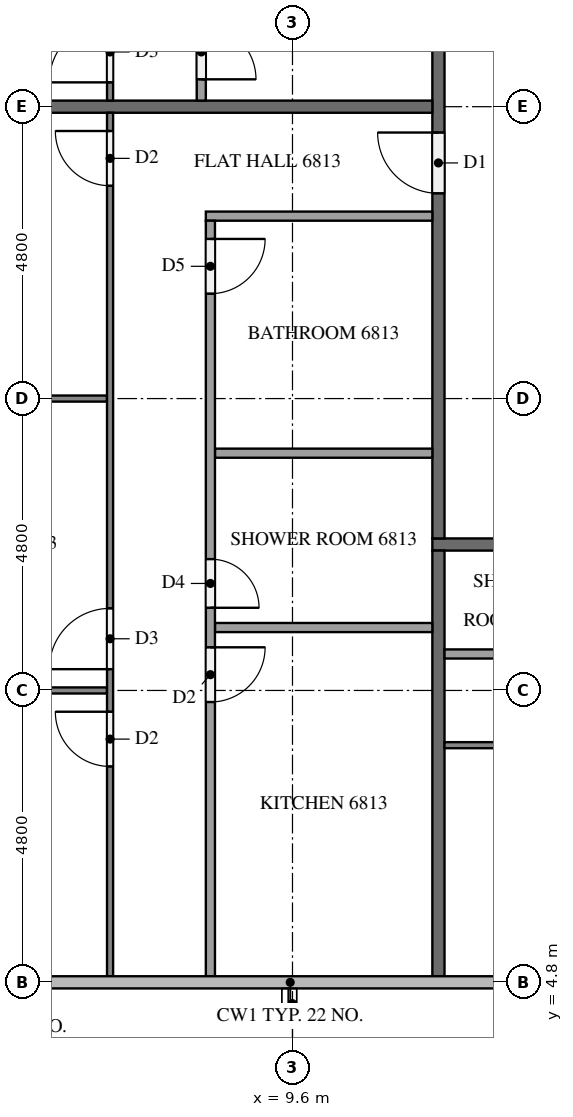
"""IFC4 building model, lengths in metres.
Left out: names, types, materials, properties, quantities, classifications, styles, units other than length and angle.
Written with IfcOpenShell. Run it as: python <this file> out.ifc"""

import sys

from ifc_helpers import new_model, si_unit, direction, frame, frame_2d, origin, place, context, subcontext, project, spatial, rectangle, extrude, element, fill, save


model = new_model("IFC4")
c1 = context("Model", 3, precision=1e-05, world=origin(), true_north=direction((0.0, 1.0)))
c2 = subcontext(c1, "Body", "Model", "MODEL_VIEW")
j1 = project(units=[si_unit("LENGTHUNIT", "METRE"), si_unit("PLANEANGLEUNIT", "RADIAN")], contexts=[c1])
p1 = place(None, origin())
s1 = spatial("IfcSite", under=j1, at=p1, CompositionType="ELEMENT")
p2 = place(p1, origin())
s2 = spatial("IfcBuilding", under=s1, at=p2, CompositionType="ELEMENT")
p3 = place(p2, frame((0.0, 0.0, 259.7)))
s3 = spatial("IfcBuildingStorey", under=s2, at=p3, CompositionType="ELEMENT", Elevation=259.7)
p4 = place(p3, frame((50.5, 12.0, 0.0), z_axis=(0.0, 0.0, 1.0), x_axis=(-1.0, 0.0, 0.0)))
e1 = element("IfcWall", 1, at=p4, inside=s3, PredefinedType="PARTITIONING", context=c2, shape_type="SweptSolid", body=[
    extrude(rectangle(XDim=38.6, YDim=0.2, at=frame_2d((19.3, 0.0))), origin(), (0.0, 0.0, 1.0), 3.1),
])
p5 = place(p4, frame((19.675, 0.0, 0.0)))
e2 = element("IfcOpeningElement", 2, at=p5, cuts=e1, PredefinedType="OPENING", context=c2, shape_type="SweptSolid", body=[
    extrude(rectangle(XDim=1.1, YDim=2.1, at=frame_2d((0.55, 1.05))), frame((0.0, 0.11, 0.0), z_axis=(0.0, -1.0, 0.0), x_axis=(1.0, 0.0, 0.0)), (0.0, 0.0, 1.0), 0.22),
])
p6 = place(p4, frame((2.925, 0.0, 0.0)))
e3 = element("IfcOpeningElement", 3, at=p6, cuts=e1, PredefinedType="OPENING", context=c2, shape_type="SweptSolid", body=[
    extrude(rectangle(XDim=1.0, YDim=2.1, at=frame_2d((0.5, 1.05))), frame((0.0, 0.11, 0.0), z_axis=(0.0, -1.0, 0.0), x_axis=(1.0, 0.0, 0.0)), (0.0, 0.0, 1.0), 0.22),
])
p7 = place(p4, frame((1.075, 0.0, 0.0)))
e4 = element("IfcOpeningElement", 4, at=p7, cuts=e1, PredefinedType="OPENING", context=c2, shape_type="SweptSolid", body=[
    extrude(rectangle(XDim=1.0, YDim=2.1, at=frame_2d((0.5, 1.05))), frame((0.0, 0.11, 0.0), z_axis=(0.0, -1.0, 0.0), x_axis=(1.0, 0.0, 0.0)), (0.0, 0.0, 1.0), 0.22),
])
p8 = place(p3, frame((12.0, 12.1, 0.0), z_axis=(0.0, 0.0, 1.0), x_axis=(0.0, 1.0, 0.0)))
e5 = element("IfcWall", 5, at=p8, inside=s3, PredefinedType="PARTITIONING", context=c2, shape_type="SweptSolid", body=[
    extrude(rectangle(XDim=28.6, YDim=0.2, at=frame_2d((14.3, 0.0))), origin(), (0.0, 0.0, 1.0), 3.1),
])
p9 = place(p8, frame((21.875, 0.0, 0.0)))
e6 = element("IfcOpeningElement", 6, at=p9, cuts=e5, PredefinedType="OPENING", context=c2, shape_type="SweptSolid", body=[
    extrude(rectangle(XDim=1.1, YDim=2.1, at=frame_2d((0.55, 1.05))), frame((0.0, 0.11, 0.0), z_axis=(0.0, -1.0, 0.0), x_axis=(1.0, 0.0, 0.0)), (0.0, 0.0, 1.0), 0.22),
])
p10 = place(p8, frame((20.075, 0.0, 0.0)))
e7 = element("IfcOpeningElement", 7, at=p10, cuts=e5, PredefinedType="OPENING", context=c2, shape_type="SweptSolid", body=[
    extrude(rectangle(XDim=1.0, YDim=2.1, at=frame_2d((0.5, 1.05))), frame((0.0, 0.11, 0.0), z_axis=(0.0, -1.0, 0.0), x_axis=(1.0, 0.0, 0.0)), (0.0, 0.0, 1.0), 0.22),
])
p11 = place(p8, frame((5.675, 0.0, 0.0)))
e8 = element("IfcOpeningElement", 8, at=p11, cuts=e5, PredefinedType="OPENING", context=c2, shape_type="SweptSolid", body=[
    extrude(rectangle(XDim=1.0, YDim=2.1, at=frame_2d((0.5, 1.05))), frame((0.0, 0.11, 0.0), z_axis=(0.0, -1.0, 0.0), x_axis=(1.0, 0.0, 0.0)), (0.0, 0.0, 1.0), 0.22),
])
p12 = place(p3, frame((12.0, 4.9, 0.0), z_axis=(0.0, 0.0, 1.0), x_axis=(0.0, 1.0, 0.0)))
e9 = element("IfcWall", 9, at=p12, inside=s3, PredefinedType="PARTITIONING", context=c2, shape_type="SweptSolid", body=[
    extrude(rectangle(XDim=7.0, YDim=0.2, at=frame_2d((3.5, 0.0))), origin(), (0.0, 0.0, 1.0), 3.1),
])
p13 = place(p3, frame((0.275, 19.2, 0.0), z_axis=(0.0, 0.0, 1.0), x_axis=(1.0, 0.0, 0.0)))
e10 = element("IfcWall", 10, at=p13, inside=s3, PredefinedType="PARTITIONING", context=c2, shape_type="SweptSolid", body=[
    extrude(rectangle(XDim=11.625, YDim=0.2, at=frame_2d((5.812, 0.0))), origin(), (0.0, 0.0, 1.0), 3.1),
])
p14 = place(p3, frame((31.1, 8.7, 0.0), z_axis=(0.0, 0.0, 1.0), x_axis=(-1.0, 0.0, 0.0)))
e11 = element("IfcWall", 11, at=p14, inside=s3, PredefinedType="PARTITIONING", context=c2, shape_type="SweptSolid", body=[
    extrude(rectangle(XDim=19.0, YDim=0.1, at=frame_2d((9.5, 0.0))), origin(), (0.0, 0.0, 1.0), 3.1),
])
p15 = place(p14, frame((3.45, 0.0, 0.0)))
e12 = element("IfcOpeningElement", 12, at=p15, cuts=e11, PredefinedType="OPENING", context=c2, shape_type="SweptSolid", body=[
    extrude(rectangle(XDim=0.9, YDim=2.1, at=frame_2d((0.45, 1.05))), frame((0.0, 0.06, 0.0), z_axis=(0.0, -1.0, 0.0), x_axis=(1.0, 0.0, 0.0)), (0.0, 0.0, 1.0), 0.12),
])
p16 = place(p14, frame((5.05, 0.0, 0.0)))
e13 = element("IfcOpeningElement", 13, at=p16, cuts=e11, PredefinedType="OPENING", context=c2, shape_type="SweptSolid", body=[
    extrude(rectangle(XDim=0.9, YDim=2.1, at=frame_2d((0.45, 1.05))), frame((0.0, 0.06, 0.0), z_axis=(0.0, -1.0, 0.0), x_axis=(1.0, 0.0, 0.0)), (0.0, 0.0, 1.0), 0.12),
])
p17 = place(p14, frame((12.95, 0.0, 0.0)))
e14 = element("IfcOpeningElement", 14, at=p17, cuts=e11, PredefinedType="OPENING", context=c2, shape_type="SweptSolid", body=[
    extrude(rectangle(XDim=1.0, YDim=2.1, at=frame_2d((0.5, 1.05))), frame((0.0, 0.06, 0.0), z_axis=(0.0, -1.0, 0.0), x_axis=(1.0, 0.0, 0.0)), (0.0, 0.0, 1.0), 0.12),
])
p18 = place(p14, frame((14.65, 0.0, 0.0)))
e15 = element("IfcOpeningElement", 15, at=p18, cuts=e11, PredefinedType="OPENING", context=c2, shape_type="SweptSolid", body=[
    extrude(rectangle(XDim=0.9, YDim=2.1, at=frame_2d((0.45, 1.05))), frame((0.0, 0.06, 0.0), z_axis=(0.0, -1.0, 0.0), x_axis=(1.0, 0.0, 0.0)), (0.0, 0.0, 1.0), 0.12),
])
p19 = place(p3, frame((12.1, 10.2, 0.0), z_axis=(0.0, 0.0, 1.0), x_axis=(1.0, 0.0, 0.0)))
e16 = element("IfcWall", 16, at=p19, inside=s3, PredefinedType="PARTITIONING", context=c2, shape_type="SweptSolid", body=[
    extrude(rectangle(XDim=17.225, YDim=0.15, at=frame_2d((8.612, 0.0))), origin(), (0.0, 0.0, 1.0), 3.1),
])
p20 = place(p19, frame((11.091, 0.0, 0.0)))
e17 = element("IfcOpeningElement", 17, at=p20, cuts=e16, PredefinedType="OPENING", context=c2, shape_type="SweptSolid", body=[
    extrude(rectangle(XDim=0.9, YDim=2.1, at=frame_2d((0.45, 1.05))), frame((0.0, 0.085, 0.0), z_axis=(0.0, -1.0, 0.0), x_axis=(1.0, 0.0, 0.0)), (0.0, 0.0, 1.0), 0.17),
])
p21 = place(p19, frame((9.641, 0.0, 0.0)))
e18 = element("IfcOpeningElement", 18, at=p21, cuts=e16, PredefinedType="OPENING", context=c2, shape_type="SweptSolid", body=[
    extrude(rectangle(XDim=0.8, YDim=2.1, at=frame_2d((0.4, 1.05))), frame((0.0, 0.085, 0.0), z_axis=(0.0, -1.0, 0.0), x_axis=(1.0, 0.0, 0.0)), (0.0, 0.0, 1.0), 0.17),
])
p22 = place(p19, frame((3.555, 0.0, 0.0)))
e19 = element("IfcOpeningElement", 19, at=p22, cuts=e16, PredefinedType="OPENING", context=c2, shape_type="SweptSolid", body=[
    extrude(rectangle(XDim=0.9, YDim=2.1, at=frame_2d((0.45, 1.05))), frame((0.0, 0.085, 0.0), z_axis=(0.0, -1.0, 0.0), x_axis=(1.0, 0.0, 0.0)), (0.0, 0.0, 1.0), 0.17),
])
p23 = place(p19, frame((2.105, 0.0, 0.0)))
e20 = element("IfcOpeningElement", 20, at=p23, cuts=e16, PredefinedType="OPENING", context=c2, shape_type="SweptSolid", body=[
    extrude(rectangle(XDim=0.8, YDim=2.1, at=frame_2d((0.4, 1.05))), frame((0.0, 0.085, 0.0), z_axis=(0.0, -1.0, 0.0), x_axis=(1.0, 0.0, 0.0)), (0.0, 0.0, 1.0), 0.17),
])
p24 = place(p3, frame((6.6, 19.3, 0.0), z_axis=(0.0, 0.0, 1.0), x_axis=(0.0, 1.0, 0.0)))
e21 = element("IfcWall", 21, at=p24, inside=s3, PredefinedType="PARTITIONING", context=c2, shape_type="SweptSolid", body=[
    extrude(rectangle(XDim=14.2, YDim=0.1, at=frame_2d((7.1, 0.0))), origin(), (0.0, 0.0, 1.0), 3.1),
])
p25 = place(p24, frame((9.85, 0.0, 0.0)))
e22 = element("IfcOpeningElement", 22, at=p25, cuts=e21, PredefinedType="OPENING", context=c2, shape_type="SweptSolid", body=[
    extrude(rectangle(XDim=0.9, YDim=2.1, at=frame_2d((0.45, 1.05))), frame((0.0, 0.06, 0.0), z_axis=(0.0, -1.0, 0.0), x_axis=(1.0, 0.0, 0.0)), (0.0, 0.0, 1.0), 0.12),
])
p26 = place(p24, frame((8.25, 0.0, 0.0)))
e23 = element("IfcOpeningElement", 23, at=p26, cuts=e21, PredefinedType="OPENING", context=c2, shape_type="SweptSolid", body=[
    extrude(rectangle(XDim=0.9, YDim=2.1, at=frame_2d((0.45, 1.05))), frame((0.0, 0.06, 0.0), z_axis=(0.0, -1.0, 0.0), x_axis=(1.0, 0.0, 0.0)), (0.0, 0.0, 1.0), 0.12),
])
p27 = place(p24, frame((0.3, 0.0, 0.0)))
e24 = element("IfcOpeningElement", 24, at=p27, cuts=e21, PredefinedType="OPENING", context=c2, shape_type="SweptSolid", body=[
    extrude(rectangle(XDim=1.0, YDim=2.1, at=frame_2d((0.5, 1.05))), frame((0.0, 0.06, 0.0), z_axis=(0.0, -1.0, 0.0), x_axis=(1.0, 0.0, 0.0)), (0.0, 0.0, 1.0), 0.12),
])
p28 = place(p3, frame((8.1, 31.725, 0.0), z_axis=(0.0, 0.0, 1.0), x_axis=(0.0, -1.0, 0.0)))
e25 = element("IfcWall", 25, at=p28, inside=s3, PredefinedType="PARTITIONING", context=c2, shape_type="SweptSolid", body=[
    extrude(rectangle(XDim=12.425, YDim=0.15, at=frame_2d((6.212, 0.0))), origin(), (0.0, 0.0, 1.0), 3.1),
])
p29 = place(p28, frame((2.598, 0.0, 0.0)))
e26 = element("IfcOpeningElement", 26, at=p29, cuts=e25, PredefinedType="OPENING", context=c2, shape_type="SweptSolid", body=[
    extrude(rectangle(XDim=0.9, YDim=2.1, at=frame_2d((0.45, 1.05))), frame((0.0, 0.085, 0.0), z_axis=(0.0, -1.0, 0.0), x_axis=(1.0, 0.0, 0.0)), (0.0, 0.0, 1.0), 0.17),
])
p30 = place(p28, frame((4.148, 0.0, 0.0)))
e27 = element("IfcOpeningElement", 27, at=p30, cuts=e25, PredefinedType="OPENING", context=c2, shape_type="SweptSolid", body=[
    extrude(rectangle(XDim=0.8, YDim=2.1, at=frame_2d((0.4, 1.05))), frame((0.0, 0.085, 0.0), z_axis=(0.0, -1.0, 0.0), x_axis=(1.0, 0.0, 0.0)), (0.0, 0.0, 1.0), 0.17),
])
p31 = place(p28, frame((11.175, 0.0, 0.0)))
e28 = element("IfcOpeningElement", 28, at=p31, cuts=e25, PredefinedType="OPENING", context=c2, shape_type="SweptSolid", body=[
    extrude(rectangle(XDim=0.9, YDim=2.1, at=frame_2d((0.45, 1.05))), frame((0.0, 0.085, 0.0), z_axis=(0.0, -1.0, 0.0), x_axis=(1.0, 0.0, 0.0)), (0.0, 0.0, 1.0), 0.17),
])
p32 = place(p3, frame((6.55, 14.4, 0.0), z_axis=(0.0, 0.0, 1.0), x_axis=(-1.0, 0.0, 0.0)))
e29 = element("IfcWall", 29, at=p32, inside=s3, PredefinedType="PARTITIONING", context=c2, shape_type="SweptSolid", body=[
    extrude(rectangle(XDim=6.45, YDim=0.1, at=frame_2d((3.225, 0.0))), origin(), (0.0, 0.0, 1.0), 3.1),
])
p33 = place(p3, frame((6.55, 9.6, 0.0), z_axis=(0.0, 0.0, 1.0), x_axis=(-1.0, 0.0, 0.0)))
e30 = element("IfcWall", 30, at=p33, inside=s3, PredefinedType="PARTITIONING", context=c2, shape_type="SweptSolid", body=[
    extrude(rectangle(XDim=6.2, YDim=0.1, at=frame_2d((3.1, 0.0))), origin(), (0.0, 0.0, 1.0), 3.1),
])
p34 = place(p3, frame((6.6, 4.9, 0.0), z_axis=(0.0, 0.0, 1.0), x_axis=(0.0, 1.0, 0.0)))
e31 = element("IfcWall", 31, at=p34, inside=s3, PredefinedType="PARTITIONING", context=c2, shape_type="SweptSolid", body=[
    extrude(rectangle(XDim=14.2, YDim=0.1, at=frame_2d((7.1, 0.0))), origin(), (0.0, 0.0, 1.0), 3.1),
])
p35 = place(p34, frame((13.0, 0.0, 0.0)))
e32 = element("IfcOpeningElement", 32, at=p35, cuts=e31, PredefinedType="OPENING", context=c2, shape_type="SweptSolid", body=[
    extrude(rectangle(XDim=0.9, YDim=2.1, at=frame_2d((0.45, 1.05))), frame((0.0, 0.06, 0.0), z_axis=(0.0, -1.0, 0.0), x_axis=(1.0, 0.0, 0.0)), (0.0, 0.0, 1.0), 0.12),
])
p36 = place(p34, frame((5.05, 0.0, 0.0)))
e33 = element("IfcOpeningElement", 33, at=p36, cuts=e31, PredefinedType="OPENING", context=c2, shape_type="SweptSolid", body=[
    extrude(rectangle(XDim=1.0, YDim=2.1, at=frame_2d((0.5, 1.05))), frame((0.0, 0.06, 0.0), z_axis=(0.0, -1.0, 0.0), x_axis=(1.0, 0.0, 0.0)), (0.0, 0.0, 1.0), 0.12),
])
p37 = place(p34, frame((3.45, 0.0, 0.0)))
e34 = element("IfcOpeningElement", 34, at=p37, cuts=e31, PredefinedType="OPENING", context=c2, shape_type="SweptSolid", body=[
    extrude(rectangle(XDim=0.9, YDim=2.1, at=frame_2d((0.45, 1.05))), frame((0.0, 0.06, 0.0), z_axis=(0.0, -1.0, 0.0), x_axis=(1.0, 0.0, 0.0)), (0.0, 0.0, 1.0), 0.12),
])
for number, where, z_axis, x_axis in (
    (35, (11.9, 13.502, 0.0), (0.0, 0.0, 1.0), (-1.0, 0.0, 0.0)),
    (36, (11.9, 10.635, 0.0), (0.0, 0.0, 1.0), (-1.0, 0.0, 0.0)),
):
    element("IfcWall", number, at=place(p3, frame(where, z_axis=z_axis, x_axis=x_axis)), inside=s3, PredefinedType="PARTITIONING", context=c2, shape_type="SweptSolid", body=[
        extrude(rectangle(XDim=3.575, YDim=0.15, at=frame_2d((1.788, 0.0))), origin(), (0.0, 0.0, 1.0), 3.1),
    ])
p38 = place(p3, frame((11.9, 17.4, 0.0), z_axis=(0.0, 0.0, 1.0), x_axis=(-1.0, 0.0, 0.0)))
e37 = element("IfcWall", 37, at=p38, inside=s3, PredefinedType="PARTITIONING", context=c2, shape_type="SweptSolid", body=[
    extrude(rectangle(XDim=3.725, YDim=0.15, at=frame_2d((1.862, 0.0))), origin(), (0.0, 0.0, 1.0), 3.1),
])
p39 = place(p3, frame((8.25, 17.325, 0.0), z_axis=(0.0, 0.0, 1.0), x_axis=(0.0, -1.0, 0.0)))
e38 = element("IfcWall", 38, at=p39, inside=s3, PredefinedType="PARTITIONING", context=c2, shape_type="SweptSolid", body=[
    extrude(rectangle(XDim=12.425, YDim=0.15, at=frame_2d((6.212, 0.0))), origin(), (0.0, 0.0, 1.0), 3.1),
])
p40 = place(p39, frame((0.3, 0.0, 0.0)))
e39 = element("IfcOpeningElement", 39, at=p40, cuts=e38, PredefinedType="OPENING", context=c2, shape_type="SweptSolid", body=[
    extrude(rectangle(XDim=0.9, YDim=2.1, at=frame_2d((0.45, 1.05))), frame((0.0, 0.085, 0.0), z_axis=(0.0, -1.0, 0.0), x_axis=(1.0, 0.0, 0.0)), (0.0, 0.0, 1.0), 0.17),
])
p41 = place(p39, frame((5.565, 0.0, 0.0)))
e40 = element("IfcOpeningElement", 40, at=p41, cuts=e38, PredefinedType="OPENING", context=c2, shape_type="SweptSolid", body=[
    extrude(rectangle(XDim=0.8, YDim=2.1, at=frame_2d((0.4, 1.05))), frame((0.0, 0.085, 0.0), z_axis=(0.0, -1.0, 0.0), x_axis=(1.0, 0.0, 0.0)), (0.0, 0.0, 1.0), 0.17),
])
p42 = place(p39, frame((7.015, 0.0, 0.0)))
e41 = element("IfcOpeningElement", 41, at=p42, cuts=e38, PredefinedType="OPENING", context=c2, shape_type="SweptSolid", body=[
    extrude(rectangle(XDim=0.9, YDim=2.1, at=frame_2d((0.45, 1.05))), frame((0.0, 0.085, 0.0), z_axis=(0.0, -1.0, 0.0), x_axis=(1.0, 0.0, 0.0)), (0.0, 0.0, 1.0), 0.17),
])
p43 = place(p11, origin())
e42 = element("IfcDoor", 42, at=p43, inside=s3, OperationType="SINGLE_SWING_RIGHT", PredefinedType="DOOR", context=c2, shape_type="SweptSolid", body=[
    extrude(rectangle(XDim=1.0, YDim=2.1, at=frame_2d((0.5, 1.05))), frame((0.0, 0.025, 0.0), z_axis=(0.0, -1.0, 0.0), x_axis=(1.0, 0.0, 0.0)), (0.0, 0.0, 1.0), 0.05),
])
fill(e8, e42)
p44 = place(p27, origin())
e43 = element("IfcDoor", 43, at=p44, inside=s3, OperationType="SINGLE_SWING_LEFT", PredefinedType="DOOR", context=c2, shape_type="SweptSolid", body=[
    extrude(rectangle(XDim=1.0, YDim=2.1, at=frame_2d((0.5, 1.05))), frame((0.0, 0.025, 0.0), z_axis=(0.0, -1.0, 0.0), x_axis=(1.0, 0.0, 0.0)), (0.0, 0.0, 1.0), 0.05),
])
fill(e24, e43)
p45 = place(p31, origin())
e44 = element("IfcDoor", 44, at=p45, inside=s3, OperationType="SINGLE_SWING_RIGHT", PredefinedType="DOOR", context=c2, shape_type="SweptSolid", body=[
    extrude(rectangle(XDim=0.9, YDim=2.1, at=frame_2d((0.45, 1.05))), frame((0.0, 0.025, 0.0), z_axis=(0.0, -1.0, 0.0), x_axis=(1.0, 0.0, 0.0)), (0.0, 0.0, 1.0), 0.05),
])
fill(e28, e44)
p46 = place(p35, origin())
e45 = element("IfcDoor", 45, at=p46, inside=s3, OperationType="SINGLE_SWING_RIGHT", PredefinedType="DOOR", context=c2, shape_type="SweptSolid", body=[
    extrude(rectangle(XDim=0.9, YDim=2.1, at=frame_2d((0.45, 1.05))), frame((0.0, 0.025, 0.0), z_axis=(0.0, -1.0, 0.0), x_axis=(1.0, 0.0, 0.0)), (0.0, 0.0, 1.0), 0.05),
])
fill(e32, e45)
p47 = place(p36, origin())
e46 = element("IfcDoor", 46, at=p47, inside=s3, OperationType="SINGLE_SWING_LEFT", PredefinedType="DOOR", context=c2, shape_type="SweptSolid", body=[
    extrude(rectangle(XDim=1.0, YDim=2.1, at=frame_2d((0.5, 1.05))), frame((0.0, 0.025, 0.0), z_axis=(0.0, -1.0, 0.0), x_axis=(1.0, 0.0, 0.0)), (0.0, 0.0, 1.0), 0.05),
])
fill(e33, e46)
p48 = place(p37, origin())
e47 = element("IfcDoor", 47, at=p48, inside=s3, OperationType="SINGLE_SWING_RIGHT", PredefinedType="DOOR", context=c2, shape_type="SweptSolid", body=[
    extrude(rectangle(XDim=0.9, YDim=2.1, at=frame_2d((0.45, 1.05))), frame((0.0, 0.025, 0.0), z_axis=(0.0, -1.0, 0.0), x_axis=(1.0, 0.0, 0.0)), (0.0, 0.0, 1.0), 0.05),
])
fill(e34, e47)
p49 = place(p40, origin())
e48 = element("IfcDoor", 48, at=p49, inside=s3, OperationType="SINGLE_SWING_LEFT", PredefinedType="DOOR", context=c2, shape_type="SweptSolid", body=[
    extrude(rectangle(XDim=0.9, YDim=2.1, at=frame_2d((0.45, 1.05))), frame((0.0, 0.025, 0.0), z_axis=(0.0, -1.0, 0.0), x_axis=(1.0, 0.0, 0.0)), (0.0, 0.0, 1.0), 0.05),
])
fill(e39, e48)
p50 = place(p41, origin())
e49 = element("IfcDoor", 49, at=p50, inside=s3, OperationType="SINGLE_SWING_RIGHT", PredefinedType="DOOR", context=c2, shape_type="SweptSolid", body=[
    extrude(rectangle(XDim=0.8, YDim=2.1, at=frame_2d((0.4, 1.05))), frame((0.0, 0.025, 0.0), z_axis=(0.0, -1.0, 0.0), x_axis=(1.0, 0.0, 0.0)), (0.0, 0.0, 1.0), 0.05),
])
fill(e40, e49)
p51 = place(p42, origin())
e50 = element("IfcDoor", 50, at=p51, inside=s3, OperationType="SINGLE_SWING_LEFT", PredefinedType="DOOR", context=c2, shape_type="SweptSolid", body=[
    extrude(rectangle(XDim=0.9, YDim=2.1, at=frame_2d((0.45, 1.05))), frame((0.0, 0.025, 0.0), z_axis=(0.0, -1.0, 0.0), x_axis=(1.0, 0.0, 0.0)), (0.0, 0.0, 1.0), 0.05),
])
fill(e41, e50)
save(model, sys.argv[1])
